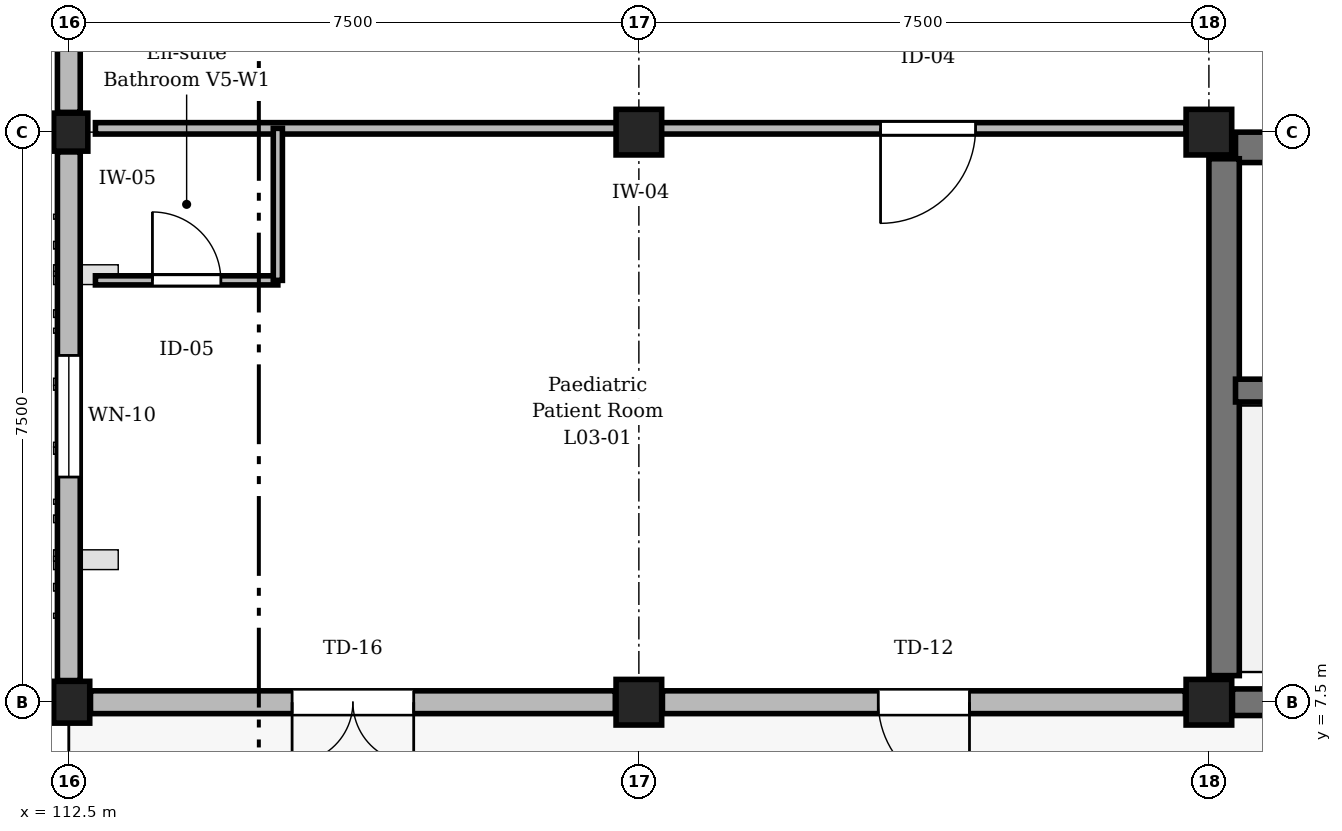
"""IFC4 building model, lengths in metres.
Left out: names, types, materials, properties, quantities, classifications, styles, units other than length and angle.
Written with IfcOpenShell. Run it as: python <this file> out.ifc"""

import sys

from ifc_helpers import new_model, si_unit, direction, frame, frame_2d, origin, origin_2d, place, context, subcontext, project, spatial, rectangle, circle, extrude, element, fill, save


model = new_model("IFC4")
c1 = context("Model", 3, precision=1e-05, world=origin(), true_north=direction((0.0, 1.0)))
c2 = subcontext(c1, "Body", "Model", "MODEL_VIEW")
j1 = project(units=[si_unit("LENGTHUNIT", "METRE"), si_unit("PLANEANGLEUNIT", "RADIAN")], contexts=[c1])
p1 = place(None, origin())
s1 = spatial("IfcSite", under=j1, at=p1, CompositionType="ELEMENT")
p2 = place(p1, origin())
s2 = spatial("IfcBuilding", under=s1, at=p2, CompositionType="ELEMENT")
p3 = place(p2, frame((0.0, 0.0, 14.1)))
s3 = spatial("IfcBuildingStorey", under=s2, at=p3, CompositionType="ELEMENT", Elevation=14.1)
p4 = place(p3, frame((112.5, 7.5, 0.0), z_axis=(0.0, 0.0, 1.0), x_axis=(1.0, 0.0, 0.0)))
e1 = element("IfcColumn", 1, at=p4, inside=s3, PredefinedType="COLUMN", context=c2, shape_type="SweptSolid", body=[
    extrude(rectangle(XDim=0.55, YDim=0.55, at=origin_2d()), origin(), (0.0, 0.0, 1.0), 3.75),
])
p5 = place(p3, frame((112.5, 15.0, 0.0), z_axis=(0.0, 0.0, 1.0), x_axis=(1.0, 0.0, 0.0)))
e2 = element("IfcColumn", 2, at=p5, inside=s3, PredefinedType="COLUMN", context=c2, shape_type="SweptSolid", body=[
    extrude(rectangle(XDim=0.5, YDim=0.5, at=origin_2d()), origin(), (0.0, 0.0, 1.0), 3.75),
])
p6 = place(p3, frame((120.0, 7.5, 0.0), z_axis=(0.0, 0.0, 1.0), x_axis=(1.0, 0.0, 0.0)))
e3 = element("IfcColumn", 3, at=p6, inside=s3, PredefinedType="COLUMN", context=c2, shape_type="SweptSolid", body=[
    extrude(rectangle(XDim=0.6, YDim=0.6, at=origin_2d()), origin(), (0.0, 0.0, 1.0), 3.75),
])
for number, where, z_axis, x_axis in (
    (4, (120.0, 15.0, 0.0), (0.0, 0.0, 1.0), (1.0, 0.0, 0.0)),
    (5, (127.5, 7.5, 0.0), (0.0, 0.0, 1.0), (1.0, 0.0, 0.0)),
):
    element("IfcColumn", number, at=place(p3, frame(where, z_axis=z_axis, x_axis=x_axis)), inside=s3, PredefinedType="COLUMN", context=c2, shape_type="SweptSolid", body=[
        extrude(circle(Radius=0.3, at=origin_2d()), origin(), (0.0, 0.0, 1.0), 3.75),
    ])
p7 = place(p3, frame((127.5, 15.0, 0.0), z_axis=(0.0, 0.0, 1.0), x_axis=(1.0, 0.0, 0.0)))
e6 = element("IfcColumn", 6, at=p7, inside=s3, PredefinedType="COLUMN", context=c2, shape_type="SweptSolid", body=[
    extrude(rectangle(XDim=0.6, YDim=0.6, at=origin_2d()), origin(), (0.0, 0.0, 1.0), 3.75),
])
p8 = place(p3, frame((119.69, 7.5, 0.0), z_axis=(0.0, 0.0, 1.0), x_axis=(-1.0, 0.0, 0.0)))
e7 = element("IfcWall", 7, at=p8, inside=s3, PredefinedType="STANDARD", context=c2, shape_type="SweptSolid", body=[
    extrude(rectangle(XDim=6.905, YDim=0.3, at=frame_2d((3.453, 0.0))), origin(), (0.0, 0.0, 1.0), 2.87),
])
p9 = place(p8, frame((2.653, 0.0, 0.0)))
e8 = element("IfcOpeningElement", 8, at=p9, cuts=e7, PredefinedType="OPENING", context=c2, shape_type="SweptSolid", body=[
    extrude(rectangle(XDim=1.6, YDim=2.35, at=frame_2d((0.8, 1.175))), frame((0.0, 0.16, 0.0), z_axis=(0.0, -1.0, 0.0), x_axis=(1.0, 0.0, 0.0)), (0.0, 0.0, 1.0), 0.32),
])
p10 = place(p3, frame((112.5, 7.785, 0.0), z_axis=(0.0, 0.0, 1.0), x_axis=(0.0, 1.0, 0.0)))
e9 = element("IfcWall", 9, at=p10, inside=s3, PredefinedType="STANDARD", context=c2, shape_type="SweptSolid", body=[
    extrude(rectangle(XDim=6.955, YDim=0.3, at=frame_2d((3.478, 0.0))), origin(), (0.0, 0.0, 1.0), 2.87),
])
p11 = place(p10, frame((2.677, 0.0, 0.9)))
e10 = element("IfcOpeningElement", 10, at=p11, cuts=e9, PredefinedType="OPENING", context=c2, shape_type="SweptSolid", body=[
    extrude(rectangle(XDim=1.6, YDim=1.69, at=frame_2d((0.8, 0.845))), frame((0.0, 0.16, 0.0), z_axis=(0.0, -1.0, 0.0), x_axis=(1.0, 0.0, 0.0)), (0.0, 0.0, 1.0), 0.32),
])
p12 = place(p3, frame((112.5, 15.26, 0.0), z_axis=(0.0, 0.0, 1.0), x_axis=(0.0, 1.0, 0.0)))
e11 = element("IfcWall", 11, at=p12, inside=s3, PredefinedType="STANDARD", context=c2, shape_type="SweptSolid", body=[
    extrude(rectangle(XDim=7.07, YDim=0.3, at=frame_2d((3.535, 0.0))), origin(), (0.0, 0.0, 1.0), 2.87),
])
p13 = place(p12, frame((2.635, 0.0, 0.9)))
e12 = element("IfcOpeningElement", 12, at=p13, cuts=e11, PredefinedType="OPENING", context=c2, shape_type="SweptSolid", body=[
    extrude(rectangle(XDim=1.8, YDim=1.69, at=frame_2d((0.9, 0.845))), frame((0.0, 0.16, 0.0), z_axis=(0.0, -1.0, 0.0), x_axis=(1.0, 0.0, 0.0)), (0.0, 0.0, 1.0), 0.32),
])
p14 = place(p3, frame((127.19, 7.5, 0.0), z_axis=(0.0, 0.0, 1.0), x_axis=(-1.0, 0.0, 0.0)))
e13 = element("IfcWall", 13, at=p14, inside=s3, PredefinedType="STANDARD", context=c2, shape_type="SweptSolid", body=[
    extrude(rectangle(XDim=6.88, YDim=0.3, at=frame_2d((3.44, 0.0))), origin(), (0.0, 0.0, 1.0), 2.87),
])
p15 = place(p14, frame((2.84, 0.0, 0.0)))
e14 = element("IfcOpeningElement", 14, at=p15, cuts=e13, PredefinedType="OPENING", context=c2, shape_type="SweptSolid", body=[
    extrude(rectangle(XDim=1.2, YDim=2.3, at=frame_2d((0.6, 1.15))), frame((0.0, 0.16, 0.0), z_axis=(0.0, -1.0, 0.0), x_axis=(1.0, 0.0, 0.0)), (0.0, 0.0, 1.0), 0.32),
])
p16 = place(p3, frame((134.69, 7.5, 0.0), z_axis=(0.0, 0.0, 1.0), x_axis=(-1.0, 0.0, 0.0)))
e15 = element("IfcWall", 15, at=p16, inside=s3, PredefinedType="SHEAR", context=c2, shape_type="SweptSolid", body=[
    extrude(rectangle(XDim=6.88, YDim=0.35, at=frame_2d((3.44, 0.0))), origin(), (0.0, 0.0, 1.0), 3.47),
])
p17 = place(p3, frame((127.85, 14.8, 0.0), z_axis=(0.0, 0.0, 1.0), x_axis=(1.0, 0.0, 0.0)))
e16 = element("IfcWall", 16, at=p17, inside=s3, PredefinedType="SHEAR", context=c2, shape_type="SweptSolid", body=[
    extrude(rectangle(XDim=14.3, YDim=0.4, at=frame_2d((7.15, 0.0))), origin(), (0.0, 0.0, 1.0), 3.47),
])
p18 = place(p3, frame((127.7, 7.85, 0.0), z_axis=(0.0, 0.0, 1.0), x_axis=(0.0, 1.0, 0.0)))
e17 = element("IfcWall", 17, at=p18, inside=s3, PredefinedType="SHEAR", context=c2, shape_type="SweptSolid", body=[
    extrude(rectangle(XDim=6.8, YDim=0.4, at=frame_2d((3.4, 0.0))), origin(), (0.0, 0.0, 1.0), 3.47),
])
p19 = place(p3, frame((127.85, 11.6, 0.0), z_axis=(0.0, 0.0, 1.0), x_axis=(1.0, 0.0, 0.0)))
e18 = element("IfcWall", 18, at=p19, inside=s3, PredefinedType="SHEAR", context=c2, shape_type="SweptSolid", body=[
    extrude(rectangle(XDim=8.05, YDim=0.3, at=frame_2d((4.025, 0.0))), origin(), (0.0, 0.0, 1.0), 3.47),
])
p20 = place(p3, frame((127.2, 15.05, 0.0), z_axis=(0.0, 0.0, 1.0), x_axis=(-1.0, 0.0, 0.0)))
e19 = element("IfcWall", 19, at=p20, inside=s3, PredefinedType="PARTITIONING", context=c2, shape_type="SweptSolid", body=[
    extrude(rectangle(XDim=14.35, YDim=0.15, at=frame_2d((7.175, 0.0))), origin(), (0.0, 0.0, 1.0), 2.855),
])
p21 = place(p20, frame((2.77, 0.0, 0.0)))
e20 = element("IfcOpeningElement", 20, at=p21, cuts=e19, PredefinedType="OPENING", context=c2, shape_type="SweptSolid", body=[
    extrude(rectangle(XDim=1.25, YDim=2.2, at=frame_2d((0.625, 1.1))), frame((0.0, 0.085, 0.0), z_axis=(0.0, -1.0, 0.0), x_axis=(1.0, 0.0, 0.0)), (0.0, 0.0, 1.0), 0.17),
])
p22 = place(p3, frame((112.85, 13.05, 0.0), z_axis=(0.0, 0.0, 1.0), x_axis=(1.0, 0.0, 0.0)))
e21 = element("IfcWall", 21, at=p22, inside=s3, PredefinedType="PARTITIONING", context=c2, shape_type="SweptSolid", body=[
    extrude(rectangle(XDim=2.4, YDim=0.12, at=frame_2d((1.2, 0.0))), origin(), (0.0, 0.0, 1.0), 3.455),
])
p23 = place(p22, frame((0.75, 0.0, 0.0)))
e22 = element("IfcOpeningElement", 22, at=p23, cuts=e21, PredefinedType="OPENING", context=c2, shape_type="SweptSolid", body=[
    extrude(rectangle(XDim=0.9, YDim=2.1, at=frame_2d((0.45, 1.05))), frame((0.0, 0.07, 0.0), z_axis=(0.0, -1.0, 0.0), x_axis=(1.0, 0.0, 0.0)), (0.0, 0.0, 1.0), 0.14),
])
p24 = place(p3, frame((115.25, 13.05, 0.0), z_axis=(0.0, 0.0, 1.0), x_axis=(0.0, 1.0, 0.0)))
e23 = element("IfcWall", 23, at=p24, inside=s3, PredefinedType="PARTITIONING", context=c2, shape_type="SweptSolid", body=[
    extrude(rectangle(XDim=2.0, YDim=0.12, at=frame_2d((1.0, 0.0))), origin(), (0.0, 0.0, 1.0), 3.455),
])
p25 = place(p9, origin())
e24 = element("IfcDoor", 24, at=p25, inside=s3, OperationType="DOUBLE_DOOR_SINGLE_SWING", PredefinedType="DOOR", context=c2, shape_type="SweptSolid", body=[
    extrude(rectangle(XDim=1.6, YDim=2.35, at=frame_2d((0.8, 1.175))), frame((0.0, 0.025, 0.0), z_axis=(0.0, -1.0, 0.0), x_axis=(1.0, 0.0, 0.0)), (0.0, 0.0, 1.0), 0.05),
])
fill(e8, e24)
p26 = place(p11, origin())
e25 = element("IfcWindow", 25, at=p26, inside=s3, PartitioningType="SINGLE_PANEL", PredefinedType="WINDOW", context=c2, shape_type="SweptSolid", body=[
    extrude(rectangle(XDim=1.6, YDim=1.69, at=frame_2d((0.8, 0.845))), frame((0.0, 0.03, 0.0), z_axis=(0.0, -1.0, 0.0), x_axis=(1.0, 0.0, 0.0)), (0.0, 0.0, 1.0), 0.06),
])
fill(e10, e25)
p27 = place(p15, origin())
e26 = element("IfcDoor", 26, at=p27, inside=s3, OperationType="SINGLE_SWING_LEFT", PredefinedType="DOOR", context=c2, shape_type="SweptSolid", body=[
    extrude(rectangle(XDim=1.2, YDim=2.3, at=frame_2d((0.6, 1.15))), frame((0.0, 0.025, 0.0), z_axis=(0.0, -1.0, 0.0), x_axis=(1.0, 0.0, 0.0)), (0.0, 0.0, 1.0), 0.05),
])
fill(e14, e26)
p28 = place(p21, origin())
e27 = element("IfcDoor", 27, at=p28, inside=s3, OperationType="SINGLE_SWING_RIGHT", PredefinedType="DOOR", context=c2, shape_type="SweptSolid", body=[
    extrude(rectangle(XDim=1.25, YDim=2.2, at=frame_2d((0.625, 1.1))), frame((0.0, 0.025, 0.0), z_axis=(0.0, -1.0, 0.0), x_axis=(1.0, 0.0, 0.0)), (0.0, 0.0, 1.0), 0.05),
])
fill(e20, e27)
p29 = place(p23, origin())
e28 = element("IfcDoor", 28, at=p29, inside=s3, OperationType="SINGLE_SWING_LEFT", PredefinedType="DOOR", context=c2, shape_type="SweptSolid", body=[
    extrude(rectangle(XDim=0.9, YDim=2.1, at=frame_2d((0.45, 1.05))), frame((0.0, 0.025, 0.0), z_axis=(0.0, -1.0, 0.0), x_axis=(1.0, 0.0, 0.0)), (0.0, 0.0, 1.0), 0.05),
])
fill(e22, e28)
save(model, sys.argv[1])
